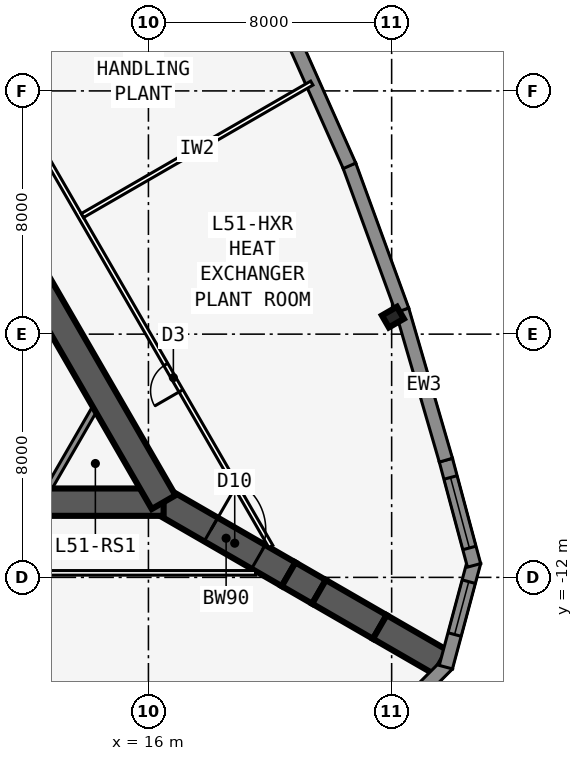
"""IFC4 building model, lengths in metres.
Left out: names, types, materials, properties, quantities, classifications, styles, units other than length and angle.
Written with IfcOpenShell. Run it as: python <this file> out.ifc"""

import sys

from ifc_helpers import new_model, si_unit, direction, frame, frame_2d, origin, origin_2d, place, context, subcontext, project, spatial, polyline, rectangle, i_section, outline, extrude, element, fill, save


model = new_model("IFC4")
c1 = context("Model", 3, precision=1e-05, world=origin(), true_north=direction((0.0, 1.0)))
c2 = subcontext(c1, "Body", "Model", "MODEL_VIEW")
j1 = project(units=[si_unit("LENGTHUNIT", "METRE"), si_unit("PLANEANGLEUNIT", "RADIAN")], contexts=[c1])
p1 = place(None, origin())
s1 = spatial("IfcSite", under=j1, at=p1, CompositionType="ELEMENT")
p2 = place(p1, origin())
s2 = spatial("IfcBuilding", under=s1, at=p2, CompositionType="ELEMENT")
p3 = place(p2, frame((0.0, 0.0, 189.5)))
s3 = spatial("IfcBuildingStorey", under=s2, at=p3, CompositionType="ELEMENT", Elevation=189.5)
p4 = place(p3, frame((0.0, -9.526, 0.0), z_axis=(0.0, 0.0, 1.0), x_axis=(1.0, 0.0, 0.0)))
e1 = element("IfcWall", 1, at=p4, inside=s3, PredefinedType="SHEAR", context=c2, shape_type="SweptSolid", body=[
    extrude(rectangle(XDim=16.5, YDim=0.9, at=frame_2d((8.25, 0.0))), origin(), (0.0, 0.0, 1.0), 6.4),
])
p5 = place(p3, frame((16.5, -9.526, 0.0), z_axis=(0.0, 0.0, 1.0), x_axis=(-0.499996545922, 0.866027397988, 0.0)))
e2 = element("IfcWall", 2, at=p5, inside=s3, PredefinedType="SHEAR", context=c2, shape_type="SweptSolid", body=[
    extrude(rectangle(XDim=16.5, YDim=0.9, at=frame_2d((8.25, 0.0))), origin(), (0.0, 0.0, 1.0), 6.4),
])
p6 = place(p5, frame((14.15, 0.0, 0.0)))
e3 = element("IfcOpeningElement", 3, at=p6, cuts=e2, PredefinedType="OPENING", context=c2, shape_type="SweptSolid", body=[
    extrude(rectangle(XDim=1.8, YDim=2.13, at=frame_2d((0.9, 1.065))), frame((0.0, 0.46, 0.0), z_axis=(0.0, -1.0, 0.0), x_axis=(1.0, 0.0, 0.0)), (0.0, 0.0, 1.0), 0.92),
])
p7 = place(p5, frame((12.6, 0.0, 0.0)))
e4 = element("IfcOpeningElement", 4, at=p7, cuts=e2, PredefinedType="OPENING", context=c2, shape_type="SweptSolid", body=[
    extrude(rectangle(XDim=1.0, YDim=2.13, at=frame_2d((0.5, 1.065))), frame((0.0, 0.46, 0.0), z_axis=(0.0, -1.0, 0.0), x_axis=(1.0, 0.0, 0.0)), (0.0, 0.0, 1.0), 0.92),
])
p8 = place(p3, frame((16.5, -9.526, 0.0), z_axis=(0.0, 0.0, 1.0), x_axis=(0.866031398331, -0.499989616998, 0.0)))
e5 = element("IfcWall", 5, at=p8, inside=s3, PredefinedType="SHEAR", context=c2, shape_type="SweptSolid", body=[
    extrude(rectangle(XDim=4.746, YDim=0.9, at=frame_2d((2.373, 0.0))), origin(), (0.0, 0.0, 1.0), 6.4),
])
p9 = place(p8, frame((1.8, 0.0, 0.0)))
e6 = element("IfcOpeningElement", 6, at=p9, cuts=e5, PredefinedType="OPENING", context=c2, shape_type="SweptSolid", body=[
    extrude(rectangle(XDim=1.8, YDim=2.13, at=frame_2d((0.9, 1.065))), frame((0.0, 0.46, 0.0), z_axis=(0.0, -1.0, 0.0), x_axis=(1.0, 0.0, 0.0)), (0.0, 0.0, 1.0), 0.92),
])
p10 = place(p3, frame((20.61, -11.899, 0.0), z_axis=(0.0, 0.0, 1.0), x_axis=(0.866009537788, -0.500027479704, 0.0)))
e7 = element("IfcWall", 7, at=p10, inside=s3, PredefinedType="SHEAR", context=c2, shape_type="SweptSolid", body=[
    extrude(rectangle(XDim=1.155, YDim=0.9, at=frame_2d((0.577, 0.0))), origin(), (0.0, 0.0, 1.0), 6.4),
])
for number, where, z_axis, x_axis in (
    (8, (21.61, -12.477, 0.0), (0.0, 0.0, 1.0), (0.866, -0.5, 0.0)),
    (9, (23.61, -13.631, 0.0), (0.0, 0.0, 1.0), (0.866, -0.5, 0.0)),
):
    element("IfcWall", number, at=place(p3, frame(where, z_axis=z_axis, x_axis=x_axis)), inside=s3, PredefinedType="SHEAR", context=c2, shape_type="SweptSolid", body=[
        extrude(rectangle(XDim=2.309, YDim=0.9, at=frame_2d((1.155, 0.0))), origin(), (0.0, 0.0, 1.0), 6.4),
    ])
p11 = place(p3, frame((8.25, 4.763, 0.0), z_axis=(0.0, 0.0, 1.0), x_axis=(0.866023543838, 0.500003221507, 0.0)))
e10 = element("IfcWall", 10, at=p11, inside=s3, PredefinedType="SHEAR", context=c2, shape_type="SweptSolid", body=[
    extrude(rectangle(XDim=8.154, YDim=0.9, at=frame_2d((4.077, 0.0))), origin(), (0.0, 0.0, 1.0), 6.4),
])
p12 = place(p3, frame((24.041, -3.44, 0.0), z_axis=(0.0, 0.0, 1.0), x_axis=(-0.5, 0.866025403784, 0.0)))
e11 = element("IfcColumn", 11, at=p12, inside=s3, PredefinedType="COLUMN", context=c2, shape_type="SweptSolid", body=[
    extrude(i_section(OverallWidth=0.455, OverallDepth=0.569, WebThickness=0.078, FlangeThickness=0.125, at=origin_2d()), origin(), (0.0, 0.0, 1.0), 6.4),
])
p13 = place(p3, frame((23.305, -17.388, 0.0), z_axis=(0.0, 0.0, 1.0), x_axis=(0.707106781187, 0.707106781187, 0.0)))
e12 = element("IfcWall", 12, at=p13, inside=s3, PredefinedType="SOLIDWALL", context=c2, shape_type="SweptSolid", body=[
    extrude(outline(polyline([(3.586, 0.225), (3.527, 0.225), (3.035, 0.093), (3.0, 0.225), (0.0, 0.225), (0.0, -0.225), (3.586, -0.225), (3.586, 0.225)])), origin(), (0.0, 0.0, 1.0), 6.15),
])
p14 = place(p13, frame((0.675, 0.0, 1.2)))
e13 = element("IfcOpeningElement", 13, at=p14, cuts=e12, PredefinedType="OPENING", context=c2, shape_type="SweptSolid", body=[
    extrude(rectangle(XDim=1.8, YDim=3.6, at=frame_2d((0.9, 1.8))), frame((0.0, 0.235, 0.0), z_axis=(0.0, -1.0, 0.0), x_axis=(1.0, 0.0, 0.0)), (0.0, 0.0, 1.0), 0.47),
])
p15 = place(p3, frame((25.783, -14.953, 0.0), z_axis=(0.0, 0.0, 1.0), x_axis=(0.258823421857, 0.965924653531, 0.0)))
e14 = element("IfcWall", 14, at=p15, inside=s3, PredefinedType="SOLIDWALL", context=c2, shape_type="SweptSolid", body=[
    extrude(outline(polyline([(3.586, 0.225), (0.586, 0.225), (0.551, 0.093), (0.06, 0.225), (0.0, 0.225), (0.0, -0.225), (3.586, -0.225), (3.586, 0.225)])), origin(), (0.0, 0.0, 1.0), 6.15),
])
p16 = place(p15, frame((1.111, 0.0, 1.2)))
e15 = element("IfcOpeningElement", 15, at=p16, cuts=e14, PredefinedType="OPENING", context=c2, shape_type="SweptSolid", body=[
    extrude(rectangle(XDim=1.8, YDim=3.6, at=frame_2d((0.9, 1.8))), frame((0.0, 0.235, 0.0), z_axis=(0.0, -1.0, 0.0), x_axis=(1.0, 0.0, 0.0)), (0.0, 0.0, 1.0), 0.47),
])
p17 = place(p3, frame((26.711, -11.605, 0.0), z_axis=(0.0, 0.0, 1.0), x_axis=(-0.258823421857, 0.965924653531, 0.0)))
e16 = element("IfcWall", 16, at=p17, inside=s3, PredefinedType="SOLIDWALL", context=c2, shape_type="SweptSolid", body=[
    extrude(rectangle(XDim=3.586, YDim=0.45, at=frame_2d((1.793, 0.0))), origin(), (0.0, 0.0, 1.0), 6.15),
])
p18 = place(p17, frame((0.593, 0.0, 1.2)))
e17 = element("IfcOpeningElement", 17, at=p18, cuts=e16, PredefinedType="OPENING", context=c2, shape_type="SweptSolid", body=[
    extrude(rectangle(XDim=2.4, YDim=3.6, at=frame_2d((1.2, 1.8))), frame((0.0, 0.235, 0.0), z_axis=(0.0, -1.0, 0.0), x_axis=(1.0, 0.0, 0.0)), (0.0, 0.0, 1.0), 0.47),
])
p19 = place(p3, frame((25.784, -8.146, 0.0), z_axis=(0.0, 0.0, 1.0), x_axis=(-0.279528287117, 0.960137457191, 0.0)))
e18 = element("IfcWall", 18, at=p19, inside=s3, PredefinedType="SOLIDWALL", context=c2, shape_type="SweptSolid", body=[
    extrude(outline(polyline([(0.0, 0.0), (5.148, 0.0), (5.148, 6.15), (0.0, 6.15), (0.0, 0.0)]), holes=[polyline([(4.524, 3.075), (4.458, 3.58), (4.263, 4.05), (3.953, 4.454), (3.549, 4.764), (3.079, 4.958), (2.574, 5.025), (2.069, 4.958), (1.599, 4.764), (1.195, 4.454), (0.885, 4.05), (0.69, 3.58), (0.624, 3.075), (0.69, 2.57), (0.885, 2.1), (1.195, 1.696), (1.599, 1.386), (2.069, 1.191), (2.574, 1.125), (3.079, 1.191), (3.549, 1.386), (3.953, 1.696), (4.263, 2.1), (4.458, 2.57), (4.524, 3.075)])]), frame((0.0, 0.225, 0.0), z_axis=(0.0, -1.0, 0.0), x_axis=(1.0, 0.0, 0.0)), (0.0, 0.0, 1.0), 0.45),
])
p20 = place(p3, frame((24.35, -3.218, 0.0), z_axis=(0.0, 0.0, 1.0), x_axis=(-0.343210088389, 0.939258662578, 0.0)))
e19 = element("IfcWall", 19, at=p20, inside=s3, PredefinedType="SOLIDWALL", context=c2, shape_type="SweptSolid", body=[
    extrude(outline(polyline([(0.0, 0.0), (5.076, 0.0), (5.076, 6.15), (0.0, 6.15), (0.0, 0.0)]), holes=[polyline([(4.438, 3.075), (4.373, 3.567), (4.184, 4.025), (3.882, 4.418), (3.488, 4.72), (3.03, 4.91), (2.538, 4.975), (2.046, 4.91), (1.588, 4.72), (1.195, 4.418), (0.893, 4.025), (0.703, 3.567), (0.638, 3.075), (0.703, 2.583), (0.893, 2.125), (1.195, 1.731), (1.588, 1.43), (2.046, 1.24), (2.538, 1.175), (3.03, 1.24), (3.488, 1.43), (3.882, 1.731), (4.184, 2.125), (4.373, 2.583), (4.438, 3.075)])]), frame((0.0, 0.225, 0.0), z_axis=(0.0, -1.0, 0.0), x_axis=(1.0, 0.0, 0.0)), (0.0, 0.0, 1.0), 0.45),
])
p21 = place(p3, frame((22.613, 1.536, 0.0), z_axis=(0.0, 0.0, 1.0), x_axis=(-0.406850247885, 0.913494869058, 0.0)))
e20 = element("IfcWall", 20, at=p21, inside=s3, PredefinedType="SOLIDWALL", context=c2, shape_type="SweptSolid", body=[
    extrude(outline(polyline([(0.0, 0.0), (5.027, 0.0), (5.027, 6.15), (0.0, 6.15), (0.0, 0.0)]), holes=[polyline([(4.414, 3.075), (4.349, 3.567), (4.159, 4.025), (3.857, 4.418), (3.464, 4.72), (3.006, 4.91), (2.514, 4.975), (2.022, 4.91), (1.564, 4.72), (1.17, 4.418), (0.868, 4.025), (0.678, 3.567), (0.614, 3.075), (0.678, 2.583), (0.868, 2.125), (1.17, 1.731), (1.564, 1.43), (2.022, 1.24), (2.514, 1.175), (3.006, 1.24), (3.464, 1.43), (3.857, 1.731), (4.159, 2.125), (4.349, 2.583), (4.414, 3.075)])]), frame((0.0, 0.225, 0.0), z_axis=(0.0, -1.0, 0.0), x_axis=(1.0, 0.0, 0.0)), (0.0, 0.0, 1.0), 0.45),
])
p22 = place(p3, frame((-19.527, -11.851, 0.0), z_axis=(0.0, 0.0, 1.0), x_axis=(1.0, 0.0, 0.0)))
e21 = element("IfcWall", 21, at=p22, inside=s3, PredefinedType="PARTITIONING", context=c2, shape_type="SweptSolid", body=[
    extrude(rectangle(XDim=39.054, YDim=0.15, at=frame_2d((19.527, 0.0))), origin(), (0.0, 0.0, 1.0), 6.15),
])
p23 = place(p22, frame((6.914, 0.0, 0.0)))
e22 = element("IfcOpeningElement", 22, at=p23, cuts=e21, PredefinedType="OPENING", context=c2, shape_type="SweptSolid", body=[
    extrude(rectangle(XDim=1.0, YDim=2.13, at=frame_2d((0.5, 1.065))), frame((0.0, 0.085, 0.0), z_axis=(0.0, -1.0, 0.0), x_axis=(1.0, 0.0, 0.0)), (0.0, 0.0, 1.0), 0.17),
])
p24 = place(p22, frame((16.527, 0.0, 0.0)))
e23 = element("IfcOpeningElement", 23, at=p24, cuts=e21, PredefinedType="OPENING", context=c2, shape_type="SweptSolid", body=[
    extrude(rectangle(XDim=1.0, YDim=2.13, at=frame_2d((0.5, 1.065))), frame((0.0, 0.085, 0.0), z_axis=(0.0, -1.0, 0.0), x_axis=(1.0, 0.0, 0.0)), (0.0, 0.0, 1.0), 0.17),
])
p25 = place(p22, frame((28.64, 0.0, 0.0)))
e24 = element("IfcOpeningElement", 24, at=p25, cuts=e21, PredefinedType="OPENING", context=c2, shape_type="SweptSolid", body=[
    extrude(rectangle(XDim=1.0, YDim=2.13, at=frame_2d((0.5, 1.065))), frame((0.0, 0.085, 0.0), z_axis=(0.0, -1.0, 0.0), x_axis=(1.0, 0.0, 0.0)), (0.0, 0.0, 1.0), 0.17),
])
p26 = place(p3, frame((20.027, -10.985, 0.0), z_axis=(0.0, 0.0, 1.0), x_axis=(-0.500001677587, 0.866024435227, 0.0)))
e25 = element("IfcWall", 25, at=p26, inside=s3, PredefinedType="PARTITIONING", context=c2, shape_type="SweptSolid", body=[
    extrude(rectangle(XDim=39.054, YDim=0.15, at=frame_2d((19.527, 0.0))), origin(), (0.0, 0.0, 1.0), 6.15),
])
p27 = place(p26, frame((5.914, 0.0, 0.0)))
e26 = element("IfcOpeningElement", 26, at=p27, cuts=e25, PredefinedType="OPENING", context=c2, shape_type="SweptSolid", body=[
    extrude(rectangle(XDim=1.0, YDim=2.13, at=frame_2d((0.5, 1.065))), frame((0.0, 0.085, 0.0), z_axis=(0.0, -1.0, 0.0), x_axis=(1.0, 0.0, 0.0)), (0.0, 0.0, 1.0), 0.17),
])
p28 = place(p26, frame((15.527, 0.0, 0.0)))
e27 = element("IfcOpeningElement", 27, at=p28, cuts=e25, PredefinedType="OPENING", context=c2, shape_type="SweptSolid", body=[
    extrude(rectangle(XDim=1.0, YDim=2.13, at=frame_2d((0.5, 1.065))), frame((0.0, 0.085, 0.0), z_axis=(0.0, -1.0, 0.0), x_axis=(1.0, 0.0, 0.0)), (0.0, 0.0, 1.0), 0.17),
])
p29 = place(p26, frame((22.027, 0.0, 0.0)))
e28 = element("IfcOpeningElement", 28, at=p29, cuts=e25, PredefinedType="OPENING", context=c2, shape_type="SweptSolid", body=[
    extrude(rectangle(XDim=1.0, YDim=2.13, at=frame_2d((0.5, 1.065))), frame((0.0, 0.085, 0.0), z_axis=(0.0, -1.0, 0.0), x_axis=(1.0, 0.0, 0.0)), (0.0, 0.0, 1.0), 0.17),
])
p30 = place(p26, frame((31.64, 0.0, 0.0)))
e29 = element("IfcOpeningElement", 29, at=p30, cuts=e25, PredefinedType="OPENING", context=c2, shape_type="SweptSolid", body=[
    extrude(rectangle(XDim=1.0, YDim=2.13, at=frame_2d((0.5, 1.065))), frame((0.0, 0.085, 0.0), z_axis=(0.0, -1.0, 0.0), x_axis=(1.0, 0.0, 0.0)), (0.0, 0.0, 1.0), 0.17),
])
p31 = place(p3, frame((13.829, -0.099, 0.0), z_axis=(0.0, 0.0, 1.0), x_axis=(0.866013391923, 0.500020804578, 0.0)))
e30 = element("IfcWall", 30, at=p31, inside=s3, PredefinedType="PARTITIONING", context=c2, shape_type="SweptSolid", body=[
    extrude(rectangle(XDim=8.713, YDim=0.15, at=frame_2d((4.356, 0.0))), origin(), (0.0, 0.0, 1.0), 6.15),
])
p32 = place(p3, frame((14.219, -6.476, 0.0), z_axis=(0.0, 0.0, 1.0), x_axis=(-0.499952404951, -0.866052881055, 0.0)))
e31 = element("IfcWall", 31, at=p32, inside=s3, PredefinedType="SOLIDWALL", context=c2, shape_type="SweptSolid", body=[
    extrude(rectangle(XDim=3.002, YDim=0.2, at=frame_2d((1.501, 0.0))), origin(), (0.0, 0.0, 1.0), 6.15),
])
p33 = place(p16, origin())
e32 = element("IfcWindow", 32, at=p33, inside=s3, PartitioningType="SINGLE_PANEL", PredefinedType="WINDOW", context=c2, shape_type="SweptSolid", body=[
    extrude(rectangle(XDim=1.8, YDim=3.6, at=frame_2d((0.9, 1.8))), frame((0.0, 0.03, 0.0), z_axis=(0.0, -1.0, 0.0), x_axis=(1.0, 0.0, 0.0)), (0.0, 0.0, 1.0), 0.06),
])
fill(e15, e32)
p34 = place(p18, origin())
e33 = element("IfcWindow", 33, at=p34, inside=s3, PartitioningType="SINGLE_PANEL", PredefinedType="WINDOW", context=c2, shape_type="SweptSolid", body=[
    extrude(rectangle(XDim=2.4, YDim=3.6, at=frame_2d((1.2, 1.8))), frame((0.0, 0.03, 0.0), z_axis=(0.0, -1.0, 0.0), x_axis=(1.0, 0.0, 0.0)), (0.0, 0.0, 1.0), 0.06),
])
fill(e17, e33)
p35 = place(p27, origin())
e34 = element("IfcDoor", 34, at=p35, inside=s3, OperationType="SINGLE_SWING_LEFT", PredefinedType="DOOR", context=c2, shape_type="SweptSolid", body=[
    extrude(rectangle(XDim=1.0, YDim=2.13, at=frame_2d((0.5, 1.065))), frame((0.0, 0.025, 0.0), z_axis=(0.0, -1.0, 0.0), x_axis=(1.0, 0.0, 0.0)), (0.0, 0.0, 1.0), 0.05),
])
fill(e26, e34)
p36 = place(p9, origin())
e35 = element("IfcDoor", 35, at=p36, inside=s3, OperationType="DOUBLE_DOOR_DOUBLE_SWING", PredefinedType="DOOR", context=c2, shape_type="SweptSolid", body=[
    extrude(rectangle(XDim=1.8, YDim=2.13, at=frame_2d((0.9, 1.065))), frame((0.0, 0.025, 0.0), z_axis=(0.0, -1.0, 0.0), x_axis=(1.0, 0.0, 0.0)), (0.0, 0.0, 1.0), 0.05),
])
fill(e6, e35)
save(model, sys.argv[1])
